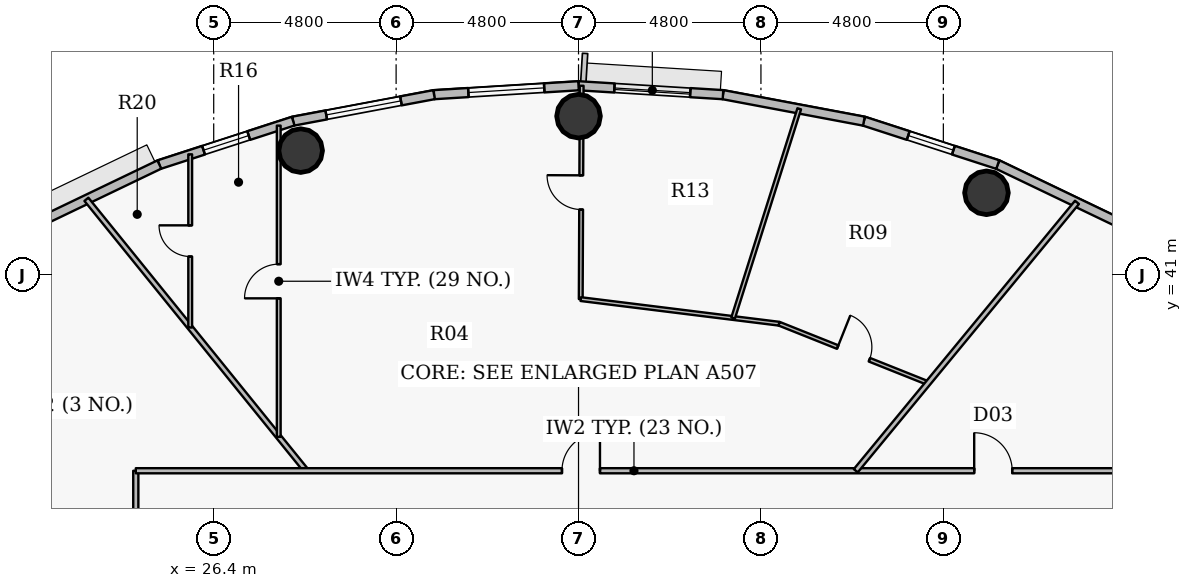
"""IFC4 building model, lengths in metres.
Left out: names, types, materials, properties, quantities, classifications, styles, units other than length and angle.
Written with IfcOpenShell. Run it as: python <this file> out.ifc"""

import sys

from ifc_helpers import new_model, si_unit, direction, frame, frame_2d, origin, origin_2d, place, context, subcontext, project, spatial, rectangle, hollow_circle, extrude, source, transform, mapped, element, fill, save


model = new_model("IFC4")
c1 = context("Model", 3, precision=1e-05, world=origin(), true_north=direction((0.0, 1.0)))
c2 = subcontext(c1, "Body", "Model", "MODEL_VIEW")
j1 = project(units=[si_unit("LENGTHUNIT", "METRE"), si_unit("PLANEANGLEUNIT", "RADIAN")], contexts=[c1])
p1 = place(None, origin())
s1 = spatial("IfcSite", under=j1, at=p1, CompositionType="ELEMENT")
p2 = place(p1, origin())
s2 = spatial("IfcBuilding", under=s1, at=p2, CompositionType="ELEMENT")
p3 = place(p2, frame((0.0, 0.0, 244.05)))
s3 = spatial("IfcBuildingStorey", under=s2, at=p3, CompositionType="ELEMENT", Elevation=244.05)
for number, where, z_axis, x_axis in (
    (1, (46.735, 43.164, 0.0), (0.0, 0.0, 1.0), (1.0, 0.0, 0.0)),
    (2, (36.0, 45.18, 0.0), (0.0, 0.0, 1.0), (1.0, 0.0, 0.0)),
    (3, (28.688, 44.273, 0.0), (0.0, 0.0, 1.0), (1.0, 0.0, 0.0)),
):
    element("IfcColumn", number, at=place(p3, frame(where, z_axis=z_axis, x_axis=x_axis)), inside=s3, PredefinedType="COLUMN", context=c2, shape_type="SweptSolid", body=[
        extrude(hollow_circle(Radius=0.575, WallThickness=0.036, at=origin_2d()), origin(), (0.0, 0.0, 1.0), 3.75),
    ])
p4 = place(p3, frame((47.031, 43.906, 0.0), z_axis=(0.0, 0.0, 1.0), x_axis=(0.901598104751, -0.432574684313, 0.0)))
e4 = element("IfcWall", 4, at=p4, inside=s3, PredefinedType="SOLIDWALL", context=c2, shape_type="SweptSolid", body=[
    extrude(rectangle(XDim=3.604, YDim=0.24, at=frame_2d((1.802, 0.0))), origin(), (0.0, 0.0, 1.0), 3.5),
])
p5 = place(p3, frame((43.509, 45.049, 0.0), z_axis=(0.0, 0.0, 1.0), x_axis=(0.951210789182, -0.308541787354, 0.0)))
e5 = element("IfcWall", 5, at=p5, inside=s3, PredefinedType="SOLIDWALL", context=c2, shape_type="SweptSolid", body=[
    extrude(rectangle(XDim=3.702, YDim=0.24, at=frame_2d((1.851, 0.0))), origin(), (0.0, 0.0, 1.0), 3.5),
])
p6 = place(p5, frame((1.226, 0.0, 0.9)))
e6 = element("IfcOpeningElement", 6, at=p6, cuts=e5, PredefinedType="OPENING", context=c2, shape_type="SweptSolid", body=[
    extrude(rectangle(XDim=1.25, YDim=1.65, at=origin_2d()), frame((0.625, 0.13, 0.825), z_axis=(0.0, -1.0, 0.0), x_axis=(1.0, 0.0, 0.0)), (0.0, 0.0, 1.0), 0.26),
])
p7 = place(p3, frame((39.802, 45.746, 0.0), z_axis=(0.0, 0.0, 1.0), x_axis=(0.982784898575, -0.184753465822, 0.0)))
e7 = element("IfcWall", 7, at=p7, inside=s3, PredefinedType="SOLIDWALL", context=c2, shape_type="SweptSolid", body=[
    extrude(rectangle(XDim=3.773, YDim=0.24, at=frame_2d((1.886, 0.0))), origin(), (0.0, 0.0, 1.0), 3.5),
])
p8 = place(p3, frame((36.0, 45.98, 0.0), z_axis=(0.0, 0.0, 1.0), x_axis=(0.998108785312, -0.06147237333, 0.0)))
e8 = element("IfcWall", 8, at=p8, inside=s3, PredefinedType="SOLIDWALL", context=c2, shape_type="SweptSolid", body=[
    extrude(rectangle(XDim=3.809, YDim=0.24, at=frame_2d((1.904, 0.0))), origin(), (0.0, 0.0, 1.0), 3.5),
])
p9 = place(p8, frame((0.946, 0.0, 0.9)))
e9 = element("IfcOpeningElement", 9, at=p9, cuts=e8, PredefinedType="OPENING", context=c2, shape_type="SweptSolid", body=[
    extrude(rectangle(XDim=2.0, YDim=1.75, at=origin_2d()), frame((1.0, 0.13, 0.875), z_axis=(0.0, -1.0, 0.0), x_axis=(1.0, 0.0, 0.0)), (0.0, 0.0, 1.0), 0.26),
])
p10 = place(p3, frame((32.198, 45.746, 0.0), z_axis=(0.0, 0.0, 1.0), x_axis=(0.998108785312, 0.06147237333, 0.0)))
e10 = element("IfcWall", 10, at=p10, inside=s3, PredefinedType="SOLIDWALL", context=c2, shape_type="SweptSolid", body=[
    extrude(rectangle(XDim=3.809, YDim=0.24, at=frame_2d((1.904, 0.0))), origin(), (0.0, 0.0, 1.0), 3.5),
])
p11 = place(p10, frame((0.905, 0.0, 0.9)))
e11 = element("IfcOpeningElement", 11, at=p11, cuts=e10, PredefinedType="OPENING", context=c2, shape_type="SweptSolid", body=[
    extrude(rectangle(XDim=2.0, YDim=1.75, at=origin_2d()), frame((1.0, 0.13, 0.875), z_axis=(0.0, -1.0, 0.0), x_axis=(1.0, 0.0, 0.0)), (0.0, 0.0, 1.0), 0.26),
])
p12 = place(p3, frame((28.491, 45.049, 0.0), z_axis=(0.0, 0.0, 1.0), x_axis=(0.982784898575, 0.184753465822, 0.0)))
e12 = element("IfcWall", 12, at=p12, inside=s3, PredefinedType="SOLIDWALL", context=c2, shape_type="SweptSolid", body=[
    extrude(rectangle(XDim=3.773, YDim=0.24, at=frame_2d((1.886, 0.0))), origin(), (0.0, 0.0, 1.0), 3.5),
])
p13 = place(p12, frame((0.886, 0.0, 0.9)))
e13 = element("IfcOpeningElement", 13, at=p13, cuts=e12, PredefinedType="OPENING", context=c2, shape_type="SweptSolid", body=[
    extrude(rectangle(XDim=2.0, YDim=1.75, at=origin_2d()), frame((1.0, 0.13, 0.875), z_axis=(0.0, -1.0, 0.0), x_axis=(1.0, 0.0, 0.0)), (0.0, 0.0, 1.0), 0.26),
])
p14 = place(p3, frame((24.969, 43.906, 0.0), z_axis=(0.0, 0.0, 1.0), x_axis=(0.951210789182, 0.308541787354, 0.0)))
e14 = element("IfcWall", 14, at=p14, inside=s3, PredefinedType="SOLIDWALL", context=c2, shape_type="SweptSolid", body=[
    extrude(rectangle(XDim=3.702, YDim=0.24, at=frame_2d((1.851, 0.0))), origin(), (0.0, 0.0, 1.0), 3.5),
])
p15 = place(p14, frame((1.223, 0.0, 0.9)))
e15 = element("IfcOpeningElement", 15, at=p15, cuts=e14, PredefinedType="OPENING", context=c2, shape_type="SweptSolid", body=[
    extrude(rectangle(XDim=1.25, YDim=1.65, at=origin_2d()), frame((0.625, 0.13, 0.825), z_axis=(0.0, -1.0, 0.0), x_axis=(1.0, 0.0, 0.0)), (0.0, 0.0, 1.0), 0.26),
])
p16 = place(p3, frame((21.72, 42.348, 0.0), z_axis=(0.0, 0.0, 1.0), x_axis=(0.901598104751, 0.432574684313, 0.0)))
e16 = element("IfcWall", 16, at=p16, inside=s3, PredefinedType="SOLIDWALL", context=c2, shape_type="SweptSolid", body=[
    extrude(rectangle(XDim=3.604, YDim=0.24, at=frame_2d((1.802, 0.0))), origin(), (0.0, 0.0, 1.0), 3.5),
])
p17 = place(p3, frame((23.05, 42.991, 0.0), z_axis=(0.0, 0.0, 1.0), x_axis=(0.629320507303, -0.777145867317, 0.0)))
e17 = element("IfcWall", 17, at=p17, inside=s3, PredefinedType="PARTITIONING", context=c2, shape_type="SweptSolid", body=[
    extrude(rectangle(XDim=9.189, YDim=0.135, at=frame_2d((4.595, 0.0))), origin(), (0.0, 0.0, 1.0), 2.985),
])
p18 = place(p3, frame((24.35, 28.019, 0.0), z_axis=(0.0, 0.0, 1.0), x_axis=(0.0, 1.0, 0.0)))
e18 = element("IfcWall", 18, at=p18, inside=s3, PredefinedType="PARTITIONING", context=c2, shape_type="SweptSolid", body=[
    extrude(rectangle(XDim=7.831, YDim=0.135, at=frame_2d((3.916, 0.0))), origin(), (0.0, 0.0, 1.0), 2.935),
])
p19 = place(p18, frame((4.435, 0.0, 0.0)))
e19 = element("IfcOpeningElement", 19, at=p19, cuts=e18, PredefinedType="OPENING", context=c2, shape_type="SweptSolid", body=[
    extrude(rectangle(XDim=1.05, YDim=2.15, at=origin_2d()), frame((0.525, 0.078, 1.075), z_axis=(0.0, -1.0, 0.0), x_axis=(1.0, 0.0, 0.0)), (0.0, 0.0, 1.0), 0.155),
])
p20 = place(p18, frame((0.674, 0.0, 0.0)))
e20 = element("IfcOpeningElement", 20, at=p20, cuts=e18, PredefinedType="OPENING", context=c2, shape_type="SweptSolid", body=[
    extrude(rectangle(XDim=0.82, YDim=2.1, at=origin_2d()), frame((0.41, 0.078, 1.05), z_axis=(0.0, -1.0, 0.0), x_axis=(1.0, 0.0, 0.0)), (0.0, 0.0, 1.0), 0.155),
])
p21 = place(p3, frame((24.35, 35.85, 0.0), z_axis=(0.0, 0.0, 1.0), x_axis=(1.0, 0.0, 0.0)))
e21 = element("IfcWall", 21, at=p21, inside=s3, PredefinedType="PARTITIONING", context=c2, shape_type="SweptSolid", body=[
    extrude(rectangle(XDim=26.218, YDim=0.135, at=frame_2d((13.109, 0.0))), origin(), (0.0, 0.0, 1.0), 2.935),
])
p22 = place(p21, frame((22.062, 0.0, 0.0)))
e22 = element("IfcOpeningElement", 22, at=p22, cuts=e21, PredefinedType="OPENING", context=c2, shape_type="SweptSolid", body=[
    extrude(rectangle(XDim=1.0, YDim=2.15, at=origin_2d()), frame((0.5, 0.078, 1.075), z_axis=(0.0, -1.0, 0.0), x_axis=(1.0, 0.0, 0.0)), (0.0, 0.0, 1.0), 0.155),
])
p23 = place(p21, frame((11.214, 0.0, 0.0)))
e23 = element("IfcOpeningElement", 23, at=p23, cuts=e21, PredefinedType="OPENING", context=c2, shape_type="SweptSolid", body=[
    extrude(rectangle(XDim=1.0, YDim=2.15, at=origin_2d()), frame((0.5, 0.078, 1.075), z_axis=(0.0, -1.0, 0.0), x_axis=(1.0, 0.0, 0.0)), (0.0, 0.0, 1.0), 0.155),
])
p24 = place(p3, frame((25.782, 39.619, 0.0), z_axis=(0.0, 0.0, 1.0), x_axis=(0.0, 1.0, 0.0)))
e24 = element("IfcWall", 24, at=p24, inside=s3, PredefinedType="PARTITIONING", context=c2, shape_type="SweptSolid", body=[
    extrude(rectangle(XDim=4.557, YDim=0.1, at=frame_2d((2.278, 0.0))), origin(), (0.0, 0.0, 1.0), 2.985),
])
p25 = place(p24, frame((1.868, 0.0, 0.0)))
e25 = element("IfcOpeningElement", 25, at=p25, cuts=e24, PredefinedType="OPENING", context=c2, shape_type="SweptSolid", body=[
    extrude(rectangle(XDim=0.82, YDim=2.1, at=origin_2d()), frame((0.41, 0.06, 1.05), z_axis=(0.0, -1.0, 0.0), x_axis=(1.0, 0.0, 0.0)), (0.0, 0.0, 1.0), 0.12),
])
p26 = place(p3, frame((28.111, 36.742, 0.0), z_axis=(0.0, 0.0, 1.0), x_axis=(0.0, 1.0, 0.0)))
e26 = element("IfcWall", 26, at=p26, inside=s3, PredefinedType="PARTITIONING", context=c2, shape_type="SweptSolid", body=[
    extrude(rectangle(XDim=8.189, YDim=0.1, at=frame_2d((4.095, 0.0))), origin(), (0.0, 0.0, 1.0), 2.985),
])
p27 = place(p26, frame((3.645, 0.0, 0.0)))
e27 = element("IfcOpeningElement", 27, at=p27, cuts=e26, PredefinedType="OPENING", context=c2, shape_type="SweptSolid", body=[
    extrude(rectangle(XDim=0.9, YDim=2.1, at=origin_2d()), frame((0.45, 0.06, 1.05), z_axis=(0.0, -1.0, 0.0), x_axis=(1.0, 0.0, 0.0)), (0.0, 0.0, 1.0), 0.12),
])
p28 = place(p3, frame((36.058, 40.366, 0.0), z_axis=(0.0, 0.0, 1.0), x_axis=(0.004348919472, 0.999990543405, 0.0)))
e28 = element("IfcWall", 28, at=p28, inside=s3, PredefinedType="PARTITIONING", context=c2, shape_type="SweptSolid", body=[
    extrude(rectangle(XDim=5.614, YDim=0.1, at=frame_2d((2.807, 0.0))), origin(), (0.0, 0.0, 1.0), 2.935),
])
p29 = place(p28, frame((2.357, 0.0, 0.0)))
e29 = element("IfcOpeningElement", 29, at=p29, cuts=e28, PredefinedType="OPENING", context=c2, shape_type="SweptSolid", body=[
    extrude(rectangle(XDim=0.9, YDim=2.1, at=origin_2d()), frame((0.45, 0.06, 1.05), z_axis=(0.0, -1.0, 0.0), x_axis=(1.0, 0.0, 0.0)), (0.0, 0.0, 1.0), 0.12),
])
p30 = place(p3, frame((36.058, 40.366, 0.0), z_axis=(0.0, 0.0, 1.0), x_axis=(0.9924002173, -0.123052056879, 0.0)))
e30 = element("IfcWall", 30, at=p30, inside=s3, PredefinedType="PARTITIONING", context=c2, shape_type="SweptSolid", body=[
    extrude(rectangle(XDim=5.26, YDim=0.1, at=frame_2d((2.63, 0.0))), origin(), (0.0, 0.0, 1.0), 2.935),
])
p31 = place(p3, frame((40.068, 39.869, 0.0), z_axis=(0.0, 0.0, 1.0), x_axis=(0.301434937635, 0.953486747875, 0.0)))
e31 = element("IfcWall", 31, at=p31, inside=s3, PredefinedType="PARTITIONING", context=c2, shape_type="SweptSolid", body=[
    extrude(rectangle(XDim=5.773, YDim=0.1, at=frame_2d((2.887, 0.0))), origin(), (0.0, 0.0, 1.0), 2.985),
])
p32 = place(p3, frame((41.278, 39.719, 0.0), z_axis=(0.0, 0.0, 1.0), x_axis=(0.928799648329, -0.370582262478, 0.0)))
e32 = element("IfcWall", 32, at=p32, inside=s3, PredefinedType="PARTITIONING", context=c2, shape_type="SweptSolid", body=[
    extrude(rectangle(XDim=4.218, YDim=0.1, at=frame_2d((2.109, 0.0))), origin(), (0.0, 0.0, 1.0), 2.935),
])
p33 = place(p32, frame((1.659, 0.0, 0.0)))
e33 = element("IfcOpeningElement", 33, at=p33, cuts=e32, PredefinedType="OPENING", context=c2, shape_type="SweptSolid", body=[
    extrude(rectangle(XDim=0.9, YDim=2.1, at=origin_2d()), frame((0.45, 0.06, 1.05), z_axis=(0.0, -1.0, 0.0), x_axis=(1.0, 0.0, 0.0)), (0.0, 0.0, 1.0), 0.12),
])
p34 = place(p3, frame((43.295, 35.85, 0.0), z_axis=(0.0, 0.0, 1.0), x_axis=(0.636076542552, 0.771625966395, 0.0)))
e34 = element("IfcWall", 34, at=p34, inside=s3, PredefinedType="PARTITIONING", context=c2, shape_type="SweptSolid", body=[
    extrude(rectangle(XDim=9.151, YDim=0.135, at=frame_2d((4.576, 0.0))), origin(), (0.0, 0.0, 1.0), 2.985),
])
m1 = source(origin(), c2, "Body", "SweptSolid", [
    extrude(rectangle(XDim=2.0, YDim=1.75, at=origin_2d()), frame((1.0, 0.03, 0.875), z_axis=(0.0, -1.0, 0.0), x_axis=(1.0, 0.0, 0.0)), (0.0, 0.0, 1.0), 0.06),
])
p35 = place(p9, origin())
e35 = element("IfcWindow", 35, at=p35, inside=s3, PartitioningType="DOUBLE_PANEL_VERTICAL", PredefinedType="WINDOW", context=c2, shape_type="MappedRepresentation", body=[
    mapped(m1, transform((0.0, 0.0, 0.0), x_axis=(1.0, 0.0, 0.0), y_axis=(0.0, 1.0, 0.0), z_axis=(0.0, 0.0, 1.0), scale=1.0)),
])
fill(e9, e35)
p36 = place(p11, origin())
e36 = element("IfcWindow", 36, at=p36, inside=s3, PartitioningType="DOUBLE_PANEL_VERTICAL", PredefinedType="WINDOW", context=c2, shape_type="MappedRepresentation", body=[
    mapped(m1, transform((0.0, 0.0, 0.0), x_axis=(1.0, 0.0, 0.0), y_axis=(0.0, 1.0, 0.0), z_axis=(0.0, 0.0, 1.0), scale=1.0)),
])
fill(e11, e36)
p37 = place(p13, origin())
e37 = element("IfcWindow", 37, at=p37, inside=s3, PartitioningType="DOUBLE_PANEL_VERTICAL", PredefinedType="WINDOW", context=c2, shape_type="MappedRepresentation", body=[
    mapped(m1, transform((0.0, 0.0, 0.0), x_axis=(1.0, 0.0, 0.0), y_axis=(0.0, 1.0, 0.0), z_axis=(0.0, 0.0, 1.0), scale=1.0)),
])
fill(e13, e37)
m2 = source(origin(), c2, "Body", "SweptSolid", [
    extrude(rectangle(XDim=1.25, YDim=1.65, at=origin_2d()), frame((0.625, 0.03, 0.825), z_axis=(0.0, -1.0, 0.0), x_axis=(1.0, 0.0, 0.0)), (0.0, 0.0, 1.0), 0.06),
])
p38 = place(p15, origin())
e38 = element("IfcWindow", 38, at=p38, inside=s3, PartitioningType="SINGLE_PANEL", PredefinedType="WINDOW", context=c2, shape_type="MappedRepresentation", body=[
    mapped(m2, transform((0.0, 0.0, 0.0), x_axis=(1.0, 0.0, 0.0), y_axis=(0.0, 1.0, 0.0), z_axis=(0.0, 0.0, 1.0), scale=1.0)),
])
fill(e15, e38)
p39 = place(p6, origin())
e39 = element("IfcWindow", 39, at=p39, inside=s3, PartitioningType="SINGLE_PANEL", PredefinedType="WINDOW", context=c2, shape_type="MappedRepresentation", body=[
    mapped(m2, transform((0.0, 0.0, 0.0), x_axis=(1.0, 0.0, 0.0), y_axis=(0.0, 1.0, 0.0), z_axis=(0.0, 0.0, 1.0), scale=1.0)),
])
fill(e6, e39)
m3 = source(origin(), c2, "Body", "SweptSolid", [
    extrude(rectangle(XDim=1.0, YDim=2.15, at=origin_2d()), frame((0.5, 0.025, 1.075), z_axis=(0.0, -1.0, 0.0), x_axis=(1.0, 0.0, 0.0)), (0.0, 0.0, 1.0), 0.05),
])
p40 = place(p22, origin())
e40 = element("IfcDoor", 40, at=p40, inside=s3, OperationType="SINGLE_SWING_LEFT", PredefinedType="DOOR", context=c2, shape_type="MappedRepresentation", body=[
    mapped(m3, transform((0.0, 0.0, 0.0), x_axis=(1.0, 0.0, 0.0), y_axis=(0.0, 1.0, 0.0), z_axis=(0.0, 0.0, 1.0), scale=1.0)),
])
fill(e22, e40)
p41 = place(p23, origin())
e41 = element("IfcDoor", 41, at=p41, inside=s3, OperationType="SINGLE_SWING_RIGHT", PredefinedType="DOOR", context=c2, shape_type="MappedRepresentation", body=[
    mapped(m3, transform((0.0, 0.0, 0.0), x_axis=(1.0, 0.0, 0.0), y_axis=(0.0, 1.0, 0.0), z_axis=(0.0, 0.0, 1.0), scale=1.0)),
])
fill(e23, e41)
m4 = source(origin(), c2, "Body", "SweptSolid", [
    extrude(rectangle(XDim=0.9, YDim=2.1, at=origin_2d()), frame((0.45, 0.025, 1.05), z_axis=(0.0, -1.0, 0.0), x_axis=(1.0, 0.0, 0.0)), (0.0, 0.0, 1.0), 0.05),
])
p42 = place(p33, origin())
e42 = element("IfcDoor", 42, at=p42, inside=s3, OperationType="SINGLE_SWING_LEFT", PredefinedType="DOOR", context=c2, shape_type="MappedRepresentation", body=[
    mapped(m4, transform((0.0, 0.0, 0.0), x_axis=(1.0, 0.0, 0.0), y_axis=(0.0, 1.0, 0.0), z_axis=(0.0, 0.0, 1.0), scale=1.0)),
])
fill(e33, e42)
p43 = place(p29, origin())
e43 = element("IfcDoor", 43, at=p43, inside=s3, OperationType="SINGLE_SWING_RIGHT", PredefinedType="DOOR", context=c2, shape_type="MappedRepresentation", body=[
    mapped(m4, transform((0.0, 0.0, 0.0), x_axis=(1.0, 0.0, 0.0), y_axis=(0.0, 1.0, 0.0), z_axis=(0.0, 0.0, 1.0), scale=1.0)),
])
fill(e29, e43)
p44 = place(p27, origin())
e44 = element("IfcDoor", 44, at=p44, inside=s3, OperationType="SINGLE_SWING_LEFT", PredefinedType="DOOR", context=c2, shape_type="MappedRepresentation", body=[
    mapped(m4, transform((0.0, 0.0, 0.0), x_axis=(1.0, 0.0, 0.0), y_axis=(0.0, 1.0, 0.0), z_axis=(0.0, 0.0, 1.0), scale=1.0)),
])
fill(e27, e44)
m5 = source(origin(), c2, "Body", "SweptSolid", [
    extrude(rectangle(XDim=0.82, YDim=2.1, at=origin_2d()), frame((0.41, 0.025, 1.05), z_axis=(0.0, -1.0, 0.0), x_axis=(1.0, 0.0, 0.0)), (0.0, 0.0, 1.0), 0.05),
])
p45 = place(p25, origin())
e45 = element("IfcDoor", 45, at=p45, inside=s3, OperationType="SINGLE_SWING_RIGHT", PredefinedType="DOOR", context=c2, shape_type="MappedRepresentation", body=[
    mapped(m5, transform((0.0, 0.0, 0.0), x_axis=(1.0, 0.0, 0.0), y_axis=(0.0, 1.0, 0.0), z_axis=(0.0, 0.0, 1.0), scale=1.0)),
])
fill(e25, e45)
save(model, sys.argv[1])
